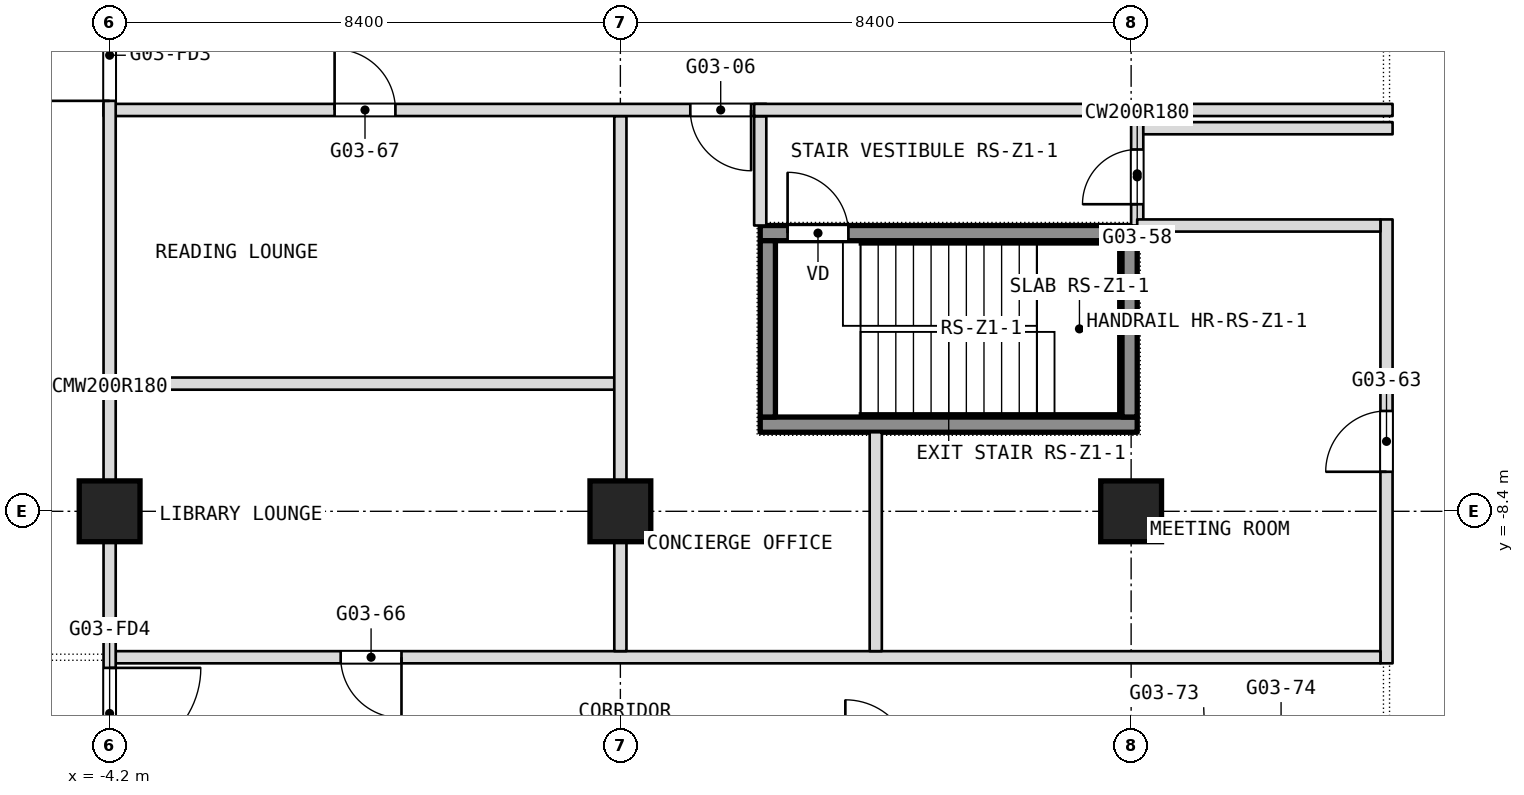
"""IFC4 building model, lengths in metres.
Left out: names, types, materials, properties, quantities, classifications, styles, units other than length and angle.
Written with IfcOpenShell. Run it as: python <this file> out.ifc"""

import sys

from ifc_helpers import new_model, si_unit, direction, frame, frame_2d, origin, origin_2d, place, context, subcontext, project, spatial, rectangle, extrude, element, fill, save


model = new_model("IFC4")
c1 = context("Model", 3, precision=1e-05, world=origin(), true_north=direction((0.0, 1.0)))
c2 = subcontext(c1, "Body", "Model", "MODEL_VIEW")
j1 = project(units=[si_unit("LENGTHUNIT", "METRE"), si_unit("PLANEANGLEUNIT", "RADIAN")], contexts=[c1])
p1 = place(None, origin())
s1 = spatial("IfcSite", under=j1, at=p1, CompositionType="ELEMENT")
p2 = place(p1, origin())
s2 = spatial("IfcBuilding", under=s1, at=p2, CompositionType="ELEMENT")
p3 = place(p2, frame((0.0, 0.0, 47.3)))
s3 = spatial("IfcBuildingStorey", under=s2, at=p3, CompositionType="ELEMENT", Elevation=47.3)
for number, where, z_axis, x_axis in (
    (1, (-4.2, -8.4, 0.0), (0.0, 0.0, 1.0), (1.0, 0.0, 0.0)),
    (2, (4.2, -8.4, 0.0), (0.0, 0.0, 1.0), (1.0, 0.0, 0.0)),
    (3, (12.6, -8.4, 0.0), (0.0, 0.0, 1.0), (1.0, 0.0, 0.0)),
):
    element("IfcColumn", number, at=place(p3, frame(where, z_axis=z_axis, x_axis=x_axis)), inside=s3, PredefinedType="COLUMN", context=c2, shape_type="SweptSolid", body=[
        extrude(rectangle(XDim=1.0, YDim=1.0, at=origin_2d()), origin(), (0.0, 0.0, 1.0), 3.6),
    ])
p4 = place(p3, frame((16.8, -10.9, 0.0), z_axis=(0.0, 0.0, 1.0), x_axis=(0.0, 1.0, 0.0)))
e4 = element("IfcWall", 4, at=p4, inside=s3, PredefinedType="PARTITIONING", context=c2, shape_type="SweptSolid", body=[
    extrude(rectangle(XDim=7.3, YDim=0.2, at=frame_2d((3.65, 0.0))), origin(), (0.0, 0.0, 1.0), 3.34),
])
p5 = place(p4, frame((3.15, 0.0, 0.0)))
e5 = element("IfcOpeningElement", 5, at=p5, cuts=e4, PredefinedType="OPENING", context=c2, shape_type="SweptSolid", body=[
    extrude(rectangle(XDim=1.0, YDim=2.1, at=frame_2d((0.5, 1.05))), frame((0.0, 0.1, 0.0), z_axis=(0.0, -1.0, 0.0), x_axis=(1.0, 0.0, 0.0)), (0.0, 0.0, 1.0), 0.2),
])
p6 = place(p3, frame((12.7, -3.7, 0.0), z_axis=(0.0, 0.0, 1.0), x_axis=(0.0, 1.0, 0.0)))
e6 = element("IfcWall", 6, at=p6, inside=s3, PredefinedType="PARTITIONING", context=c2, shape_type="SweptSolid", body=[
    extrude(rectangle(XDim=1.7, YDim=0.2, at=frame_2d((0.85, 0.0))), origin(), (0.0, 0.0, 1.0), 3.34),
])
p7 = place(p6, frame((0.35, 0.0, 0.0)))
e7 = element("IfcOpeningElement", 7, at=p7, cuts=e6, PredefinedType="OPENING", context=c2, shape_type="SweptSolid", body=[
    extrude(rectangle(XDim=0.9, YDim=2.1, at=frame_2d((0.45, 1.05))), frame((0.0, 0.1, 0.0), z_axis=(0.0, -1.0, 0.0), x_axis=(1.0, 0.0, 0.0)), (0.0, 0.0, 1.0), 0.2),
])
p8 = place(p3, frame((-4.1, -10.8, 0.0), z_axis=(0.0, 0.0, 1.0), x_axis=(1.0, 0.0, 0.0)))
e8 = element("IfcWall", 8, at=p8, inside=s3, PredefinedType="PARTITIONING", context=c2, shape_type="SweptSolid", body=[
    extrude(rectangle(XDim=20.8, YDim=0.2, at=frame_2d((10.4, 0.0))), origin(), (0.0, 0.0, 1.0), 3.34),
])
p9 = place(p8, frame((3.7, 0.0, 0.0)))
e9 = element("IfcOpeningElement", 9, at=p9, cuts=e8, PredefinedType="OPENING", context=c2, shape_type="SweptSolid", body=[
    extrude(rectangle(XDim=1.0, YDim=2.1, at=frame_2d((0.5, 1.05))), frame((0.0, 0.1, 0.0), z_axis=(0.0, -1.0, 0.0), x_axis=(1.0, 0.0, 0.0)), (0.0, 0.0, 1.0), 0.2),
])
p10 = place(p3, frame((8.4, -10.7, 0.0), z_axis=(0.0, 0.0, 1.0), x_axis=(0.0, 1.0, 0.0)))
e10 = element("IfcWall", 10, at=p10, inside=s3, PredefinedType="PARTITIONING", context=c2, shape_type="SweptSolid", body=[
    extrude(rectangle(XDim=3.6, YDim=0.2, at=frame_2d((1.8, 0.0))), origin(), (0.0, 0.0, 1.0), 3.34),
])
p11 = place(p3, frame((6.5, -3.7, 0.0), z_axis=(0.0, 0.0, 1.0), x_axis=(0.0, 1.0, 0.0)))
e11 = element("IfcWall", 11, at=p11, inside=s3, PredefinedType="PARTITIONING", context=c2, shape_type="SweptSolid", body=[
    extrude(rectangle(XDim=1.8, YDim=0.2, at=frame_2d((0.9, 0.0))), origin(), (0.0, 0.0, 1.0), 3.34),
])
p12 = place(p3, frame((-4.1, -6.3, 0.0), z_axis=(0.0, 0.0, 1.0), x_axis=(1.0, 0.0, 0.0)))
e12 = element("IfcWall", 12, at=p12, inside=s3, PredefinedType="PARTITIONING", context=c2, shape_type="SweptSolid", body=[
    extrude(rectangle(XDim=8.2, YDim=0.2, at=frame_2d((4.1, 0.0))), origin(), (0.0, 0.0, 1.0), 3.34),
])
p13 = place(p3, frame((4.2, -10.7, 0.0), z_axis=(0.0, 0.0, 1.0), x_axis=(0.0, 1.0, 0.0)))
e13 = element("IfcWall", 13, at=p13, inside=s3, PredefinedType="PARTITIONING", context=c2, shape_type="SweptSolid", body=[
    extrude(rectangle(XDim=8.8, YDim=0.2, at=frame_2d((4.4, 0.0))), origin(), (0.0, 0.0, 1.0), 3.34),
])
p14 = place(p3, frame((12.7, -3.7, 0.0), z_axis=(0.0, 0.0, 1.0), x_axis=(1.0, 0.0, 0.0)))
e14 = element("IfcWall", 14, at=p14, inside=s3, PredefinedType="PARTITIONING", context=c2, shape_type="SweptSolid", body=[
    extrude(rectangle(XDim=4.0, YDim=0.2, at=frame_2d((2.0, 0.0))), origin(), (0.0, 0.0, 1.0), 3.34),
])
p15 = place(p3, frame((12.8, -2.1, 0.0), z_axis=(0.0, 0.0, 1.0), x_axis=(1.0, 0.0, 0.0)))
e15 = element("IfcWall", 15, at=p15, inside=s3, PredefinedType="PARTITIONING", context=c2, shape_type="SweptSolid", body=[
    extrude(rectangle(XDim=4.1, YDim=0.2, at=frame_2d((2.05, 0.0))), origin(), (0.0, 0.0, 1.0), 3.34),
])
p16 = place(p3, frame((-4.3, -1.8, 0.0), z_axis=(0.0, 0.0, 1.0), x_axis=(1.0, 0.0, 0.0)))
e16 = element("IfcWall", 16, at=p16, inside=s3, PredefinedType="PARTITIONING", context=c2, shape_type="SweptSolid", body=[
    extrude(rectangle(XDim=10.9, YDim=0.2, at=frame_2d((5.45, 0.0))), origin(), (0.0, 0.0, 1.0), 3.34),
])
p17 = place(p16, frame((9.65, 0.0, 0.0)))
e17 = element("IfcOpeningElement", 17, at=p17, cuts=e16, PredefinedType="OPENING", context=c2, shape_type="SweptSolid", body=[
    extrude(rectangle(XDim=1.0, YDim=2.1, at=frame_2d((0.5, 1.05))), frame((0.0, 0.1, 0.0), z_axis=(0.0, -1.0, 0.0), x_axis=(1.0, 0.0, 0.0)), (0.0, 0.0, 1.0), 0.2),
])
p18 = place(p16, frame((3.8, 0.0, 0.0)))
e18 = element("IfcOpeningElement", 18, at=p18, cuts=e16, PredefinedType="OPENING", context=c2, shape_type="SweptSolid", body=[
    extrude(rectangle(XDim=1.0, YDim=2.1, at=frame_2d((0.5, 1.05))), frame((0.0, 0.1, 0.0), z_axis=(0.0, -1.0, 0.0), x_axis=(1.0, 0.0, 0.0)), (0.0, 0.0, 1.0), 0.2),
])
p19 = place(p3, frame((6.4, -1.8, 0.0), z_axis=(0.0, 0.0, 1.0), x_axis=(1.0, 0.0, 0.0)))
e19 = element("IfcWall", 19, at=p19, inside=s3, PredefinedType="PARTITIONING", context=c2, shape_type="SweptSolid", body=[
    extrude(rectangle(XDim=10.5, YDim=0.2, at=frame_2d((5.25, 0.0))), origin(), (0.0, 0.0, 1.0), 3.34),
])
p20 = place(p3, frame((-4.2, -12.7, 0.0), z_axis=(0.0, 0.0, 1.0), x_axis=(0.0, 1.0, 0.0)))
e20 = element("IfcWall", 20, at=p20, inside=s3, PredefinedType="PARTITIONING", context=c2, shape_type="SweptSolid", body=[
    extrude(rectangle(XDim=12.7, YDim=0.2, at=frame_2d((6.35, 0.0))), origin(), (0.0, 0.0, 1.0), 3.34),
])
p21 = place(p20, frame((11.05, 0.0, 0.0)))
e21 = element("IfcOpeningElement", 21, at=p21, cuts=e20, PredefinedType="OPENING", context=c2, shape_type="SweptSolid", body=[
    extrude(rectangle(XDim=1.5, YDim=2.1, at=frame_2d((0.75, 1.05))), frame((0.0, 0.1, 0.0), z_axis=(0.0, -1.0, 0.0), x_axis=(1.0, 0.0, 0.0)), (0.0, 0.0, 1.0), 0.2),
])
p22 = place(p20, frame((0.225, 0.0, 0.0)))
e22 = element("IfcOpeningElement", 22, at=p22, cuts=e20, PredefinedType="OPENING", context=c2, shape_type="SweptSolid", body=[
    extrude(rectangle(XDim=1.5, YDim=2.1, at=frame_2d((0.75, 1.05))), frame((0.0, 0.1, 0.0), z_axis=(0.0, -1.0, 0.0), x_axis=(1.0, 0.0, 0.0)), (0.0, 0.0, 1.0), 0.2),
])
p23 = place(p3, frame((6.5, -6.975, 0.1), z_axis=(0.0, 0.0, 1.0), x_axis=(1.0, 0.0, 0.0)))
e23 = element("IfcWall", 23, at=p23, inside=s3, PredefinedType="SHEAR", context=c2, shape_type="SweptSolid", body=[
    extrude(rectangle(XDim=6.2, YDim=0.25, at=frame_2d((3.1, 0.0))), origin(), (0.0, 0.0, 1.0), 3.6),
])
p24 = place(p3, frame((6.5, -3.825, 0.1), z_axis=(0.0, 0.0, 1.0), x_axis=(1.0, 0.0, 0.0)))
e24 = element("IfcWall", 24, at=p24, inside=s3, PredefinedType="SHEAR", context=c2, shape_type="SweptSolid", body=[
    extrude(rectangle(XDim=6.2, YDim=0.25, at=frame_2d((3.1, 0.0))), origin(), (0.0, 0.0, 1.0), 3.6),
])
p25 = place(p24, frame((0.45, 0.0, 0.0)))
e25 = element("IfcOpeningElement", 25, at=p25, cuts=e24, PredefinedType="OPENING", context=c2, shape_type="SweptSolid", body=[
    extrude(rectangle(XDim=1.0, YDim=2.1, at=frame_2d((0.5, 1.05))), frame((0.0, 0.125, 0.0), z_axis=(0.0, -1.0, 0.0), x_axis=(1.0, 0.0, 0.0)), (0.0, 0.0, 1.0), 0.25),
])
for number, where, z_axis, x_axis in (
    (26, (6.625, -6.85, 0.1), (0.0, 0.0, 1.0), (0.0, 1.0, 0.0)),
    (27, (12.575, -6.85, 0.1), (0.0, 0.0, 1.0), (0.0, 1.0, 0.0)),
):
    element("IfcWall", number, at=place(p3, frame(where, z_axis=z_axis, x_axis=x_axis)), inside=s3, PredefinedType="SHEAR", context=c2, shape_type="SweptSolid", body=[
        extrude(rectangle(XDim=2.9, YDim=0.25, at=frame_2d((1.45, 0.0))), origin(), (0.0, 0.0, 1.0), 3.6),
    ])
p26 = place(p5, origin())
e28 = element("IfcDoor", 28, at=p26, inside=s3, OperationType="SINGLE_SWING_LEFT", PredefinedType="DOOR", context=c2, shape_type="SweptSolid", body=[
    extrude(rectangle(XDim=1.0, YDim=2.1, at=frame_2d((0.5, 1.05))), frame((0.0, 0.025, 0.0), z_axis=(0.0, -1.0, 0.0), x_axis=(1.0, 0.0, 0.0)), (0.0, 0.0, 1.0), 0.05),
])
fill(e5, e28)
p27 = place(p7, origin())
e29 = element("IfcDoor", 29, at=p27, inside=s3, OperationType="SINGLE_SWING_LEFT", PredefinedType="DOOR", context=c2, shape_type="SweptSolid", body=[
    extrude(rectangle(XDim=0.9, YDim=2.1, at=frame_2d((0.45, 1.05))), frame((0.0, 0.025, 0.0), z_axis=(0.0, -1.0, 0.0), x_axis=(1.0, 0.0, 0.0)), (0.0, 0.0, 1.0), 0.05),
])
fill(e7, e29)
p28 = place(p9, origin())
e30 = element("IfcDoor", 30, at=p28, inside=s3, OperationType="SINGLE_SWING_RIGHT", PredefinedType="DOOR", context=c2, shape_type="SweptSolid", body=[
    extrude(rectangle(XDim=1.0, YDim=2.1, at=frame_2d((0.5, 1.05))), frame((0.0, 0.025, 0.0), z_axis=(0.0, -1.0, 0.0), x_axis=(1.0, 0.0, 0.0)), (0.0, 0.0, 1.0), 0.05),
])
fill(e9, e30)
p29 = place(p17, origin())
e31 = element("IfcDoor", 31, at=p29, inside=s3, OperationType="SINGLE_SWING_LEFT", PredefinedType="DOOR", context=c2, shape_type="SweptSolid", body=[
    extrude(rectangle(XDim=1.0, YDim=2.1, at=frame_2d((0.5, 1.05))), frame((0.0, 0.025, 0.0), z_axis=(0.0, -1.0, 0.0), x_axis=(1.0, 0.0, 0.0)), (0.0, 0.0, 1.0), 0.05),
])
fill(e17, e31)
p30 = place(p18, origin())
e32 = element("IfcDoor", 32, at=p30, inside=s3, OperationType="SINGLE_SWING_LEFT", PredefinedType="DOOR", context=c2, shape_type="SweptSolid", body=[
    extrude(rectangle(XDim=1.0, YDim=2.1, at=frame_2d((0.5, 1.05))), frame((0.0, 0.025, 0.0), z_axis=(0.0, -1.0, 0.0), x_axis=(1.0, 0.0, 0.0)), (0.0, 0.0, 1.0), 0.05),
])
fill(e18, e32)
p31 = place(p25, origin())
e33 = element("IfcDoor", 33, at=p31, inside=s3, OperationType="SINGLE_SWING_LEFT", PredefinedType="DOOR", context=c2, shape_type="SweptSolid", body=[
    extrude(rectangle(XDim=1.0, YDim=2.1, at=frame_2d((0.5, 1.05))), frame((0.0, 0.025, 0.0), z_axis=(0.0, -1.0, 0.0), x_axis=(1.0, 0.0, 0.0)), (0.0, 0.0, 1.0), 0.05),
])
fill(e25, e33)
p32 = place(p21, origin())
e34 = element("IfcDoor", 34, at=p32, inside=s3, OperationType="DOUBLE_DOOR_DOUBLE_SWING", PredefinedType="DOOR", context=c2, shape_type="SweptSolid", body=[
    extrude(rectangle(XDim=1.5, YDim=2.1, at=frame_2d((0.75, 1.05))), frame((0.0, 0.025, 0.0), z_axis=(0.0, -1.0, 0.0), x_axis=(1.0, 0.0, 0.0)), (0.0, 0.0, 1.0), 0.05),
])
fill(e21, e34)
p33 = place(p22, origin())
e35 = element("IfcDoor", 35, at=p33, inside=s3, OperationType="DOUBLE_DOOR_DOUBLE_SWING", PredefinedType="DOOR", context=c2, shape_type="SweptSolid", body=[
    extrude(rectangle(XDim=1.5, YDim=2.1, at=frame_2d((0.75, 1.05))), frame((0.0, 0.025, 0.0), z_axis=(0.0, -1.0, 0.0), x_axis=(1.0, 0.0, 0.0)), (0.0, 0.0, 1.0), 0.05),
])
fill(e22, e35)
save(model, sys.argv[1])
